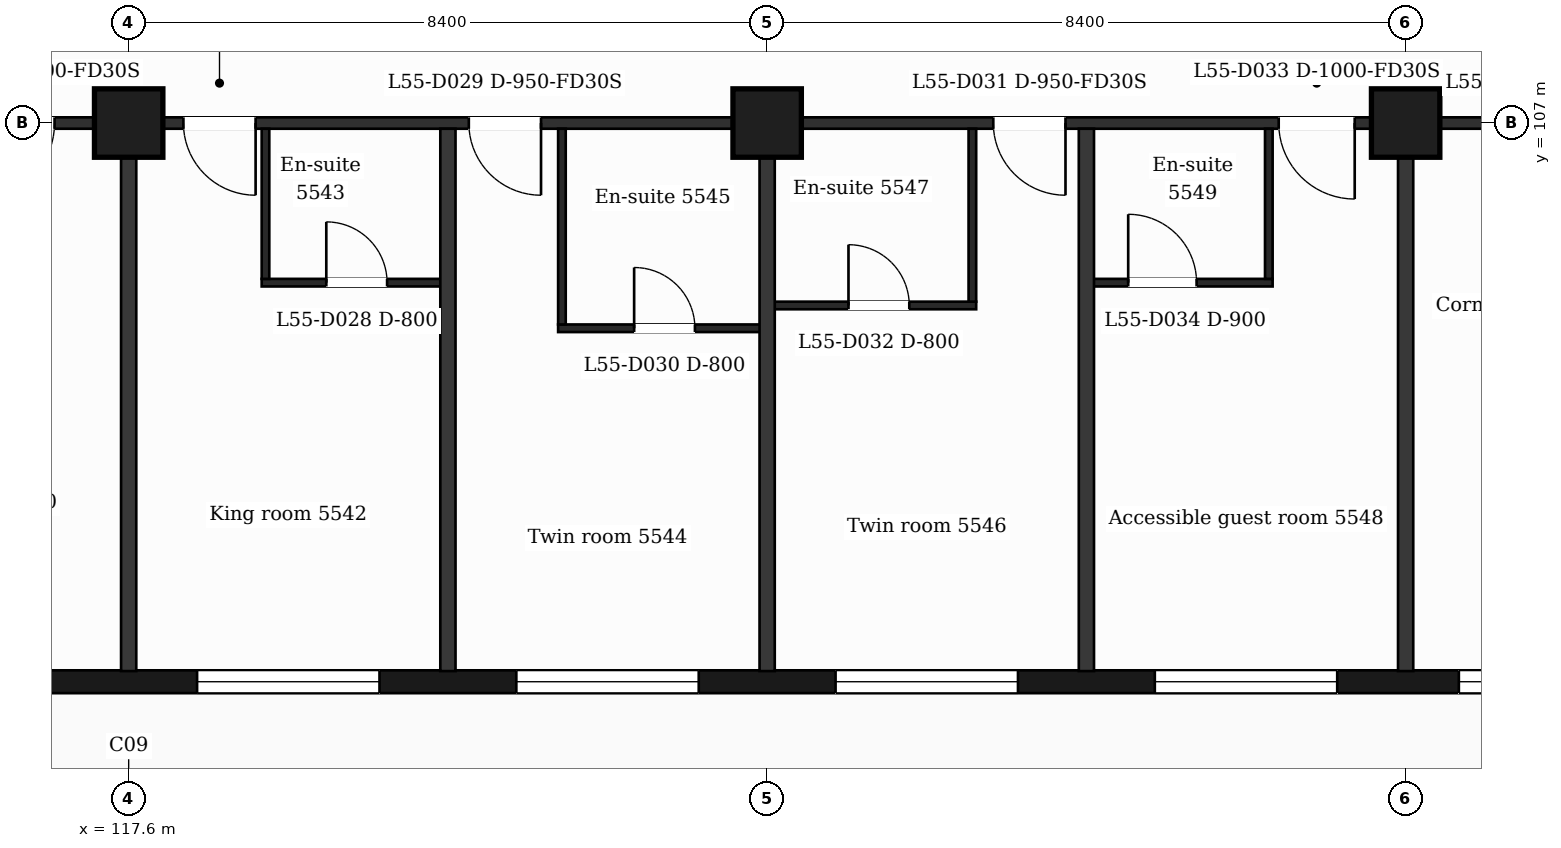
"""IFC4 building model, lengths in metres.
Left out: names, types, materials, properties, quantities, classifications, styles, units other than length and angle.
Written with IfcOpenShell. Run it as: python <this file> out.ifc"""

import sys

from ifc_helpers import new_model, si_unit, direction, frame, frame_2d, origin, origin_2d, place, context, subcontext, project, spatial, rectangle, extrude, element, fill, save


model = new_model("IFC4")
c1 = context("Model", 3, precision=1e-05, world=origin(), true_north=direction((0.0, 1.0)))
c2 = subcontext(c1, "Body", "Model", "MODEL_VIEW")
j1 = project(units=[si_unit("LENGTHUNIT", "METRE"), si_unit("PLANEANGLEUNIT", "RADIAN")], contexts=[c1])
p1 = place(None, origin())
s1 = spatial("IfcSite", under=j1, at=p1, CompositionType="ELEMENT")
p2 = place(p1, origin())
s2 = spatial("IfcBuilding", under=s1, at=p2, CompositionType="ELEMENT")
p3 = place(p2, frame((0.0, 0.0, 228.1)))
s3 = spatial("IfcBuildingStorey", under=s2, at=p3, CompositionType="ELEMENT", Elevation=228.1)
for number, where, z_axis, x_axis in (
    (1, (117.6, 107.0, 0.0), (0.0, 0.0, 1.0), (1.0, 0.0, 0.0)),
    (2, (126.0, 107.0, 0.0), (0.0, 0.0, 1.0), (1.0, 0.0, 0.0)),
    (3, (134.4, 107.0, 0.0), (0.0, 0.0, 1.0), (1.0, 0.0, 0.0)),
):
    element("IfcColumn", number, at=place(p3, frame(where, z_axis=z_axis, x_axis=x_axis)), inside=s3, PredefinedType="COLUMN", context=c2, shape_type="SweptSolid", body=[
        extrude(rectangle(XDim=0.9, YDim=0.9, at=origin_2d()), origin(), (0.0, 0.0, 1.0), 3.7),
    ])
p4 = place(p3, frame((89.85, 99.65, 0.0), z_axis=(0.0, 0.0, 1.0), x_axis=(1.0, 0.0, 0.0)))
e4 = element("IfcWall", 4, at=p4, inside=s3, PredefinedType="SOLIDWALL", context=c2, shape_type="SweptSolid", body=[
    extrude(rectangle(XDim=47.25, YDim=0.3, at=frame_2d((23.625, 0.0))), origin(), (0.0, 0.0, 1.0), 3.38),
])
p5 = place(p4, frame((0.725, 0.0, 0.9)))
e5 = element("IfcOpeningElement", 5, at=p5, cuts=e4, PredefinedType="OPENING", context=c2, shape_type="SweptSolid", body=[
    extrude(rectangle(XDim=1.2, YDim=2.1, at=frame_2d((0.6, 1.05))), frame((0.0, 0.16, 0.0), z_axis=(0.0, -1.0, 0.0), x_axis=(1.0, 0.0, 0.0)), (0.0, 0.0, 1.0), 0.32),
])
p6 = place(p4, frame((3.45, 0.0, 0.9)))
e6 = element("IfcOpeningElement", 6, at=p6, cuts=e4, PredefinedType="OPENING", context=c2, shape_type="SweptSolid", body=[
    extrude(rectangle(XDim=2.4, YDim=2.1, at=frame_2d((1.2, 1.05))), frame((0.0, 0.16, 0.0), z_axis=(0.0, -1.0, 0.0), x_axis=(1.0, 0.0, 0.0)), (0.0, 0.0, 1.0), 0.32),
])
p7 = place(p4, frame((7.35, 0.0, 0.0)))
e7 = element("IfcOpeningElement", 7, at=p7, cuts=e4, PredefinedType="OPENING", context=c2, shape_type="SweptSolid", body=[
    extrude(rectangle(XDim=1.2, YDim=2.4, at=frame_2d((0.6, 1.2))), frame((0.0, 0.16, 0.0), z_axis=(0.0, -1.0, 0.0), x_axis=(1.0, 0.0, 0.0)), (0.0, 0.0, 1.0), 0.32),
])
p8 = place(p4, frame((9.15, 0.0, 0.9)))
e8 = element("IfcOpeningElement", 8, at=p8, cuts=e4, PredefinedType="OPENING", context=c2, shape_type="SweptSolid", body=[
    extrude(rectangle(XDim=1.2, YDim=2.1, at=frame_2d((0.6, 1.05))), frame((0.0, 0.16, 0.0), z_axis=(0.0, -1.0, 0.0), x_axis=(1.0, 0.0, 0.0)), (0.0, 0.0, 1.0), 0.32),
])
p9 = place(p4, frame((11.85, 0.0, 0.9)))
e9 = element("IfcOpeningElement", 9, at=p9, cuts=e4, PredefinedType="OPENING", context=c2, shape_type="SweptSolid", body=[
    extrude(rectangle(XDim=2.4, YDim=2.1, at=frame_2d((1.2, 1.05))), frame((0.0, 0.16, 0.0), z_axis=(0.0, -1.0, 0.0), x_axis=(1.0, 0.0, 0.0)), (0.0, 0.0, 1.0), 0.32),
])
p10 = place(p4, frame((16.05, 0.0, 0.9)))
e10 = element("IfcOpeningElement", 10, at=p10, cuts=e4, PredefinedType="OPENING", context=c2, shape_type="SweptSolid", body=[
    extrude(rectangle(XDim=2.4, YDim=2.1, at=frame_2d((1.2, 1.05))), frame((0.0, 0.16, 0.0), z_axis=(0.0, -1.0, 0.0), x_axis=(1.0, 0.0, 0.0)), (0.0, 0.0, 1.0), 0.32),
])
p11 = place(p4, frame((20.85, 0.0, 0.9)))
e11 = element("IfcOpeningElement", 11, at=p11, cuts=e4, PredefinedType="OPENING", context=c2, shape_type="SweptSolid", body=[
    extrude(rectangle(XDim=1.2, YDim=2.1, at=frame_2d((0.6, 1.05))), frame((0.0, 0.16, 0.0), z_axis=(0.0, -1.0, 0.0), x_axis=(1.0, 0.0, 0.0)), (0.0, 0.0, 1.0), 0.32),
])
p12 = place(p4, frame((25.05, 0.0, 0.9)))
e12 = element("IfcOpeningElement", 12, at=p12, cuts=e4, PredefinedType="OPENING", context=c2, shape_type="SweptSolid", body=[
    extrude(rectangle(XDim=1.2, YDim=2.1, at=frame_2d((0.6, 1.05))), frame((0.0, 0.16, 0.0), z_axis=(0.0, -1.0, 0.0), x_axis=(1.0, 0.0, 0.0)), (0.0, 0.0, 1.0), 0.32),
])
p13 = place(p4, frame((28.65, 0.0, 0.9)))
e13 = element("IfcOpeningElement", 13, at=p13, cuts=e4, PredefinedType="OPENING", context=c2, shape_type="SweptSolid", body=[
    extrude(rectangle(XDim=2.4, YDim=2.1, at=frame_2d((1.2, 1.05))), frame((0.0, 0.16, 0.0), z_axis=(0.0, -1.0, 0.0), x_axis=(1.0, 0.0, 0.0)), (0.0, 0.0, 1.0), 0.32),
])
p14 = place(p4, frame((32.85, 0.0, 0.9)))
e14 = element("IfcOpeningElement", 14, at=p14, cuts=e4, PredefinedType="OPENING", context=c2, shape_type="SweptSolid", body=[
    extrude(rectangle(XDim=2.4, YDim=2.1, at=frame_2d((1.2, 1.05))), frame((0.0, 0.16, 0.0), z_axis=(0.0, -1.0, 0.0), x_axis=(1.0, 0.0, 0.0)), (0.0, 0.0, 1.0), 0.32),
])
p15 = place(p4, frame((37.05, 0.0, 0.9)))
e15 = element("IfcOpeningElement", 15, at=p15, cuts=e4, PredefinedType="OPENING", context=c2, shape_type="SweptSolid", body=[
    extrude(rectangle(XDim=2.4, YDim=2.1, at=frame_2d((1.2, 1.05))), frame((0.0, 0.16, 0.0), z_axis=(0.0, -1.0, 0.0), x_axis=(1.0, 0.0, 0.0)), (0.0, 0.0, 1.0), 0.32),
])
p16 = place(p4, frame((41.25, 0.0, 0.9)))
e16 = element("IfcOpeningElement", 16, at=p16, cuts=e4, PredefinedType="OPENING", context=c2, shape_type="SweptSolid", body=[
    extrude(rectangle(XDim=2.4, YDim=2.1, at=frame_2d((1.2, 1.05))), frame((0.0, 0.16, 0.0), z_axis=(0.0, -1.0, 0.0), x_axis=(1.0, 0.0, 0.0)), (0.0, 0.0, 1.0), 0.32),
])
p17 = place(p4, frame((45.25, 0.0, 0.9)))
e17 = element("IfcOpeningElement", 17, at=p17, cuts=e4, PredefinedType="OPENING", context=c2, shape_type="SweptSolid", body=[
    extrude(rectangle(XDim=1.2, YDim=2.1, at=frame_2d((0.6, 1.05))), frame((0.0, 0.16, 0.0), z_axis=(0.0, -1.0, 0.0), x_axis=(1.0, 0.0, 0.0)), (0.0, 0.0, 1.0), 0.32),
])
p18 = place(p3, frame((123.25, 104.3, 0.0), z_axis=(0.0, 0.0, 1.0), x_axis=(1.0, 0.0, 0.0)))
e18 = element("IfcWall", 18, at=p18, inside=s3, PredefinedType="PARTITIONING", context=c2, shape_type="SweptSolid", body=[
    extrude(rectangle(XDim=2.75, YDim=0.1, at=frame_2d((1.375, 0.0))), origin(), (0.0, 0.0, 1.0), 3.38),
])
p19 = place(p18, frame((1.0, 0.0, 0.0)))
e19 = element("IfcOpeningElement", 19, at=p19, cuts=e18, PredefinedType="OPENING", context=c2, shape_type="SweptSolid", body=[
    extrude(rectangle(XDim=0.8, YDim=2.1, at=frame_2d((0.4, 1.05))), frame((0.0, 0.06, 0.0), z_axis=(0.0, -1.0, 0.0), x_axis=(1.0, 0.0, 0.0)), (0.0, 0.0, 1.0), 0.12),
])
p20 = place(p3, frame((126.0, 104.6, 0.0), z_axis=(0.0, 0.0, 1.0), x_axis=(1.0, 0.0, 0.0)))
e20 = element("IfcWall", 20, at=p20, inside=s3, PredefinedType="PARTITIONING", context=c2, shape_type="SweptSolid", body=[
    extrude(rectangle(XDim=2.75, YDim=0.1, at=frame_2d((1.375, 0.0))), origin(), (0.0, 0.0, 1.0), 3.38),
])
p21 = place(p20, frame((1.07, 0.0, 0.0)))
e21 = element("IfcOpeningElement", 21, at=p21, cuts=e20, PredefinedType="OPENING", context=c2, shape_type="SweptSolid", body=[
    extrude(rectangle(XDim=0.8, YDim=2.1, at=frame_2d((0.4, 1.05))), frame((0.0, 0.06, 0.0), z_axis=(0.0, -1.0, 0.0), x_axis=(1.0, 0.0, 0.0)), (0.0, 0.0, 1.0), 0.12),
])
p22 = place(p3, frame((119.35, 104.9, 0.0), z_axis=(0.0, 0.0, 1.0), x_axis=(1.0, 0.0, 0.0)))
e22 = element("IfcWall", 22, at=p22, inside=s3, PredefinedType="PARTITIONING", context=c2, shape_type="SweptSolid", body=[
    extrude(rectangle(XDim=2.45, YDim=0.1, at=frame_2d((1.225, 0.0))), origin(), (0.0, 0.0, 1.0), 3.38),
])
p23 = place(p22, frame((0.85, 0.0, 0.0)))
e23 = element("IfcOpeningElement", 23, at=p23, cuts=e22, PredefinedType="OPENING", context=c2, shape_type="SweptSolid", body=[
    extrude(rectangle(XDim=0.8, YDim=2.1, at=frame_2d((0.4, 1.05))), frame((0.0, 0.06, 0.0), z_axis=(0.0, -1.0, 0.0), x_axis=(1.0, 0.0, 0.0)), (0.0, 0.0, 1.0), 0.12),
])
p24 = place(p3, frame((130.2, 104.9, 0.0), z_axis=(0.0, 0.0, 1.0), x_axis=(1.0, 0.0, 0.0)))
e24 = element("IfcWall", 24, at=p24, inside=s3, PredefinedType="PARTITIONING", context=c2, shape_type="SweptSolid", body=[
    extrude(rectangle(XDim=2.45, YDim=0.1, at=frame_2d((1.225, 0.0))), origin(), (0.0, 0.0, 1.0), 3.38),
])
p25 = place(p24, frame((0.55, 0.0, 0.0)))
e25 = element("IfcOpeningElement", 25, at=p25, cuts=e24, PredefinedType="OPENING", context=c2, shape_type="SweptSolid", body=[
    extrude(rectangle(XDim=0.9, YDim=2.1, at=frame_2d((0.45, 1.05))), frame((0.0, 0.06, 0.0), z_axis=(0.0, -1.0, 0.0), x_axis=(1.0, 0.0, 0.0)), (0.0, 0.0, 1.0), 0.12),
])
p26 = place(p3, frame((87.018, 107.0, 0.0), z_axis=(0.0, 0.0, 1.0), x_axis=(1.0, 0.0, 0.0)))
e26 = element("IfcWall", 26, at=p26, inside=s3, PredefinedType="PARTITIONING", context=c2, shape_type="SweptSolid", body=[
    extrude(rectangle(XDim=52.765, YDim=0.15, at=frame_2d((26.382, 0.0))), origin(), (0.0, 0.0, 1.0), 3.38),
])
p27 = place(p26, frame((0.707, 0.0, 0.0)))
e27 = element("IfcOpeningElement", 27, at=p27, cuts=e26, PredefinedType="OPENING", context=c2, shape_type="SweptSolid", body=[
    extrude(rectangle(XDim=0.95, YDim=2.1, at=frame_2d((0.475, 1.05))), frame((0.0, 0.085, 0.0), z_axis=(0.0, -1.0, 0.0), x_axis=(1.0, 0.0, 0.0)), (0.0, 0.0, 1.0), 0.17),
])
p28 = place(p26, frame((6.894, 0.0, 0.0)))
e28 = element("IfcOpeningElement", 28, at=p28, cuts=e26, PredefinedType="OPENING", context=c2, shape_type="SweptSolid", body=[
    extrude(rectangle(XDim=0.95, YDim=2.1, at=frame_2d((0.475, 1.05))), frame((0.0, 0.085, 0.0), z_axis=(0.0, -1.0, 0.0), x_axis=(1.0, 0.0, 0.0)), (0.0, 0.0, 1.0), 0.17),
])
p29 = place(p26, frame((15.662, 0.0, 0.0)))
e29 = element("IfcOpeningElement", 29, at=p29, cuts=e26, PredefinedType="OPENING", context=c2, shape_type="SweptSolid", body=[
    extrude(rectangle(XDim=0.95, YDim=2.1, at=frame_2d((0.475, 1.05))), frame((0.0, 0.085, 0.0), z_axis=(0.0, -1.0, 0.0), x_axis=(1.0, 0.0, 0.0)), (0.0, 0.0, 1.0), 0.17),
])
p30 = place(p26, frame((18.257, 0.0, 0.0)))
e30 = element("IfcOpeningElement", 30, at=p30, cuts=e26, PredefinedType="OPENING", context=c2, shape_type="SweptSolid", body=[
    extrude(rectangle(XDim=0.95, YDim=2.1, at=frame_2d((0.475, 1.05))), frame((0.0, 0.085, 0.0), z_axis=(0.0, -1.0, 0.0), x_axis=(1.0, 0.0, 0.0)), (0.0, 0.0, 1.0), 0.17),
])
p31 = place(p26, frame((28.607, 0.0, 0.0)))
e31 = element("IfcOpeningElement", 31, at=p31, cuts=e26, PredefinedType="OPENING", context=c2, shape_type="SweptSolid", body=[
    extrude(rectangle(XDim=1.0, YDim=2.1, at=frame_2d((0.5, 1.05))), frame((0.0, 0.085, 0.0), z_axis=(0.0, -1.0, 0.0), x_axis=(1.0, 0.0, 0.0)), (0.0, 0.0, 1.0), 0.17),
])
p32 = place(p26, frame((31.302, 0.0, 0.0)))
e32 = element("IfcOpeningElement", 32, at=p32, cuts=e26, PredefinedType="OPENING", context=c2, shape_type="SweptSolid", body=[
    extrude(rectangle(XDim=0.95, YDim=2.1, at=frame_2d((0.475, 1.05))), frame((0.0, 0.085, 0.0), z_axis=(0.0, -1.0, 0.0), x_axis=(1.0, 0.0, 0.0)), (0.0, 0.0, 1.0), 0.17),
])
p33 = place(p26, frame((35.057, 0.0, 0.0)))
e33 = element("IfcOpeningElement", 33, at=p33, cuts=e26, PredefinedType="OPENING", context=c2, shape_type="SweptSolid", body=[
    extrude(rectangle(XDim=0.95, YDim=2.1, at=frame_2d((0.475, 1.05))), frame((0.0, 0.085, 0.0), z_axis=(0.0, -1.0, 0.0), x_axis=(1.0, 0.0, 0.0)), (0.0, 0.0, 1.0), 0.17),
])
p34 = place(p26, frame((41.957, 0.0, 0.0)))
e34 = element("IfcOpeningElement", 34, at=p34, cuts=e26, PredefinedType="OPENING", context=c2, shape_type="SweptSolid", body=[
    extrude(rectangle(XDim=0.95, YDim=2.1, at=frame_2d((0.475, 1.05))), frame((0.0, 0.085, 0.0), z_axis=(0.0, -1.0, 0.0), x_axis=(1.0, 0.0, 0.0)), (0.0, 0.0, 1.0), 0.17),
])
p35 = place(p26, frame((45.712, 0.0, 0.0)))
e35 = element("IfcOpeningElement", 35, at=p35, cuts=e26, PredefinedType="OPENING", context=c2, shape_type="SweptSolid", body=[
    extrude(rectangle(XDim=1.0, YDim=2.1, at=frame_2d((0.5, 1.05))), frame((0.0, 0.085, 0.0), z_axis=(0.0, -1.0, 0.0), x_axis=(1.0, 0.0, 0.0)), (0.0, 0.0, 1.0), 0.17),
])
p36 = place(p26, frame((48.974, 0.0, 0.0)))
e36 = element("IfcOpeningElement", 36, at=p36, cuts=e26, PredefinedType="OPENING", context=c2, shape_type="SweptSolid", body=[
    extrude(rectangle(XDim=0.95, YDim=2.1, at=frame_2d((0.475, 1.05))), frame((0.0, 0.085, 0.0), z_axis=(0.0, -1.0, 0.0), x_axis=(1.0, 0.0, 0.0)), (0.0, 0.0, 1.0), 0.17),
])
p37 = place(p3, frame((117.6, 99.79, 0.0), z_axis=(0.0, 0.0, 1.0), x_axis=(0.0, 1.0, 0.0)))
e37 = element("IfcWall", 37, at=p37, inside=s3, PredefinedType="PARTITIONING", context=c2, shape_type="SweptSolid", body=[
    extrude(rectangle(XDim=7.135, YDim=0.2, at=frame_2d((3.567, 0.0))), origin(), (0.0, 0.0, 1.0), 3.38),
])
p38 = place(p3, frame((119.4, 104.95, 0.0), z_axis=(0.0, 0.0, 1.0), x_axis=(0.0, 1.0, 0.0)))
e38 = element("IfcWall", 38, at=p38, inside=s3, PredefinedType="PARTITIONING", context=c2, shape_type="SweptSolid", body=[
    extrude(rectangle(XDim=1.975, YDim=0.1, at=frame_2d((0.988, 0.0))), origin(), (0.0, 0.0, 1.0), 3.38),
])
p39 = place(p3, frame((121.8, 99.79, 0.0), z_axis=(0.0, 0.0, 1.0), x_axis=(0.0, 1.0, 0.0)))
e39 = element("IfcWall", 39, at=p39, inside=s3, PredefinedType="PARTITIONING", context=c2, shape_type="SweptSolid", body=[
    extrude(rectangle(XDim=7.135, YDim=0.2, at=frame_2d((3.567, 0.0))), origin(), (0.0, 0.0, 1.0), 3.38),
])
p40 = place(p3, frame((123.3, 104.35, 0.0), z_axis=(0.0, 0.0, 1.0), x_axis=(0.0, 1.0, 0.0)))
e40 = element("IfcWall", 40, at=p40, inside=s3, PredefinedType="PARTITIONING", context=c2, shape_type="SweptSolid", body=[
    extrude(rectangle(XDim=2.575, YDim=0.1, at=frame_2d((1.288, 0.0))), origin(), (0.0, 0.0, 1.0), 3.38),
])
p41 = place(p3, frame((126.0, 99.79, 0.0), z_axis=(0.0, 0.0, 1.0), x_axis=(0.0, 1.0, 0.0)))
e41 = element("IfcWall", 41, at=p41, inside=s3, PredefinedType="PARTITIONING", context=c2, shape_type="SweptSolid", body=[
    extrude(rectangle(XDim=7.135, YDim=0.2, at=frame_2d((3.567, 0.0))), origin(), (0.0, 0.0, 1.0), 3.38),
])
p42 = place(p3, frame((128.7, 104.65, 0.0), z_axis=(0.0, 0.0, 1.0), x_axis=(0.0, 1.0, 0.0)))
e42 = element("IfcWall", 42, at=p42, inside=s3, PredefinedType="PARTITIONING", context=c2, shape_type="SweptSolid", body=[
    extrude(rectangle(XDim=2.275, YDim=0.1, at=frame_2d((1.138, 0.0))), origin(), (0.0, 0.0, 1.0), 3.38),
])
p43 = place(p3, frame((130.2, 99.79, 0.0), z_axis=(0.0, 0.0, 1.0), x_axis=(0.0, 1.0, 0.0)))
e43 = element("IfcWall", 43, at=p43, inside=s3, PredefinedType="PARTITIONING", context=c2, shape_type="SweptSolid", body=[
    extrude(rectangle(XDim=7.135, YDim=0.2, at=frame_2d((3.567, 0.0))), origin(), (0.0, 0.0, 1.0), 3.38),
])
p44 = place(p3, frame((132.6, 104.95, 0.0), z_axis=(0.0, 0.0, 1.0), x_axis=(0.0, 1.0, 0.0)))
e44 = element("IfcWall", 44, at=p44, inside=s3, PredefinedType="PARTITIONING", context=c2, shape_type="SweptSolid", body=[
    extrude(rectangle(XDim=1.975, YDim=0.1, at=frame_2d((0.988, 0.0))), origin(), (0.0, 0.0, 1.0), 3.38),
])
p45 = place(p3, frame((134.4, 99.79, 0.0), z_axis=(0.0, 0.0, 1.0), x_axis=(0.0, 1.0, 0.0)))
e45 = element("IfcWall", 45, at=p45, inside=s3, PredefinedType="PARTITIONING", context=c2, shape_type="SweptSolid", body=[
    extrude(rectangle(XDim=7.135, YDim=0.2, at=frame_2d((3.567, 0.0))), origin(), (0.0, 0.0, 1.0), 3.38),
])
p46 = place(p13, origin())
e46 = element("IfcWindow", 46, at=p46, inside=s3, PartitioningType="SINGLE_PANEL", PredefinedType="WINDOW", context=c2, shape_type="SweptSolid", body=[
    extrude(rectangle(XDim=2.4, YDim=2.1, at=frame_2d((1.2, 1.05))), frame((0.0, 0.03, 0.0), z_axis=(0.0, -1.0, 0.0), x_axis=(1.0, 0.0, 0.0)), (0.0, 0.0, 1.0), 0.06),
])
fill(e13, e46)
p47 = place(p14, origin())
e47 = element("IfcWindow", 47, at=p47, inside=s3, PartitioningType="SINGLE_PANEL", PredefinedType="WINDOW", context=c2, shape_type="SweptSolid", body=[
    extrude(rectangle(XDim=2.4, YDim=2.1, at=frame_2d((1.2, 1.05))), frame((0.0, 0.03, 0.0), z_axis=(0.0, -1.0, 0.0), x_axis=(1.0, 0.0, 0.0)), (0.0, 0.0, 1.0), 0.06),
])
fill(e14, e47)
p48 = place(p15, origin())
e48 = element("IfcWindow", 48, at=p48, inside=s3, PartitioningType="SINGLE_PANEL", PredefinedType="WINDOW", context=c2, shape_type="SweptSolid", body=[
    extrude(rectangle(XDim=2.4, YDim=2.1, at=frame_2d((1.2, 1.05))), frame((0.0, 0.03, 0.0), z_axis=(0.0, -1.0, 0.0), x_axis=(1.0, 0.0, 0.0)), (0.0, 0.0, 1.0), 0.06),
])
fill(e15, e48)
p49 = place(p16, origin())
e49 = element("IfcWindow", 49, at=p49, inside=s3, PartitioningType="SINGLE_PANEL", PredefinedType="WINDOW", context=c2, shape_type="SweptSolid", body=[
    extrude(rectangle(XDim=2.4, YDim=2.1, at=frame_2d((1.2, 1.05))), frame((0.0, 0.03, 0.0), z_axis=(0.0, -1.0, 0.0), x_axis=(1.0, 0.0, 0.0)), (0.0, 0.0, 1.0), 0.06),
])
fill(e16, e49)
p50 = place(p17, origin())
e50 = element("IfcWindow", 50, at=p50, inside=s3, PartitioningType="SINGLE_PANEL", PredefinedType="WINDOW", context=c2, shape_type="SweptSolid", body=[
    extrude(rectangle(XDim=1.2, YDim=2.1, at=frame_2d((0.6, 1.05))), frame((0.0, 0.03, 0.0), z_axis=(0.0, -1.0, 0.0), x_axis=(1.0, 0.0, 0.0)), (0.0, 0.0, 1.0), 0.06),
])
fill(e17, e50)
p51 = place(p31, origin())
e51 = element("IfcDoor", 51, at=p51, inside=s3, OperationType="SINGLE_SWING_LEFT", PredefinedType="DOOR", context=c2, shape_type="SweptSolid", body=[
    extrude(rectangle(XDim=1.0, YDim=2.1, at=frame_2d((0.5, 1.05))), frame((0.0, 0.025, 0.0), z_axis=(0.0, -1.0, 0.0), x_axis=(1.0, 0.0, 0.0)), (0.0, 0.0, 1.0), 0.05),
])
fill(e31, e51)
p52 = place(p32, origin())
e52 = element("IfcDoor", 52, at=p52, inside=s3, OperationType="SINGLE_SWING_RIGHT", PredefinedType="DOOR", context=c2, shape_type="SweptSolid", body=[
    extrude(rectangle(XDim=0.95, YDim=2.1, at=frame_2d((0.475, 1.05))), frame((0.0, 0.025, 0.0), z_axis=(0.0, -1.0, 0.0), x_axis=(1.0, 0.0, 0.0)), (0.0, 0.0, 1.0), 0.05),
])
fill(e32, e52)
p53 = place(p23, origin())
e53 = element("IfcDoor", 53, at=p53, inside=s3, OperationType="SINGLE_SWING_LEFT", PredefinedType="DOOR", context=c2, shape_type="SweptSolid", body=[
    extrude(rectangle(XDim=0.8, YDim=2.1, at=frame_2d((0.4, 1.05))), frame((0.0, 0.025, 0.0), z_axis=(0.0, -1.0, 0.0), x_axis=(1.0, 0.0, 0.0)), (0.0, 0.0, 1.0), 0.05),
])
fill(e23, e53)
p54 = place(p33, origin())
e54 = element("IfcDoor", 54, at=p54, inside=s3, OperationType="SINGLE_SWING_RIGHT", PredefinedType="DOOR", context=c2, shape_type="SweptSolid", body=[
    extrude(rectangle(XDim=0.95, YDim=2.1, at=frame_2d((0.475, 1.05))), frame((0.0, 0.025, 0.0), z_axis=(0.0, -1.0, 0.0), x_axis=(1.0, 0.0, 0.0)), (0.0, 0.0, 1.0), 0.05),
])
fill(e33, e54)
p55 = place(p19, origin())
e55 = element("IfcDoor", 55, at=p55, inside=s3, OperationType="SINGLE_SWING_LEFT", PredefinedType="DOOR", context=c2, shape_type="SweptSolid", body=[
    extrude(rectangle(XDim=0.8, YDim=2.1, at=frame_2d((0.4, 1.05))), frame((0.0, 0.025, 0.0), z_axis=(0.0, -1.0, 0.0), x_axis=(1.0, 0.0, 0.0)), (0.0, 0.0, 1.0), 0.05),
])
fill(e19, e55)
p56 = place(p34, origin())
e56 = element("IfcDoor", 56, at=p56, inside=s3, OperationType="SINGLE_SWING_RIGHT", PredefinedType="DOOR", context=c2, shape_type="SweptSolid", body=[
    extrude(rectangle(XDim=0.95, YDim=2.1, at=frame_2d((0.475, 1.05))), frame((0.0, 0.025, 0.0), z_axis=(0.0, -1.0, 0.0), x_axis=(1.0, 0.0, 0.0)), (0.0, 0.0, 1.0), 0.05),
])
fill(e34, e56)
p57 = place(p21, origin())
e57 = element("IfcDoor", 57, at=p57, inside=s3, OperationType="SINGLE_SWING_LEFT", PredefinedType="DOOR", context=c2, shape_type="SweptSolid", body=[
    extrude(rectangle(XDim=0.8, YDim=2.1, at=frame_2d((0.4, 1.05))), frame((0.0, 0.025, 0.0), z_axis=(0.0, -1.0, 0.0), x_axis=(1.0, 0.0, 0.0)), (0.0, 0.0, 1.0), 0.05),
])
fill(e21, e57)
p58 = place(p35, origin())
e58 = element("IfcDoor", 58, at=p58, inside=s3, OperationType="SINGLE_SWING_RIGHT", PredefinedType="DOOR", context=c2, shape_type="SweptSolid", body=[
    extrude(rectangle(XDim=1.0, YDim=2.1, at=frame_2d((0.5, 1.05))), frame((0.0, 0.025, 0.0), z_axis=(0.0, -1.0, 0.0), x_axis=(1.0, 0.0, 0.0)), (0.0, 0.0, 1.0), 0.05),
])
fill(e35, e58)
p59 = place(p25, origin())
e59 = element("IfcDoor", 59, at=p59, inside=s3, OperationType="SINGLE_SWING_LEFT", PredefinedType="DOOR", context=c2, shape_type="SweptSolid", body=[
    extrude(rectangle(XDim=0.9, YDim=2.1, at=frame_2d((0.45, 1.05))), frame((0.0, 0.025, 0.0), z_axis=(0.0, -1.0, 0.0), x_axis=(1.0, 0.0, 0.0)), (0.0, 0.0, 1.0), 0.05),
])
fill(e25, e59)
save(model, sys.argv[1])
